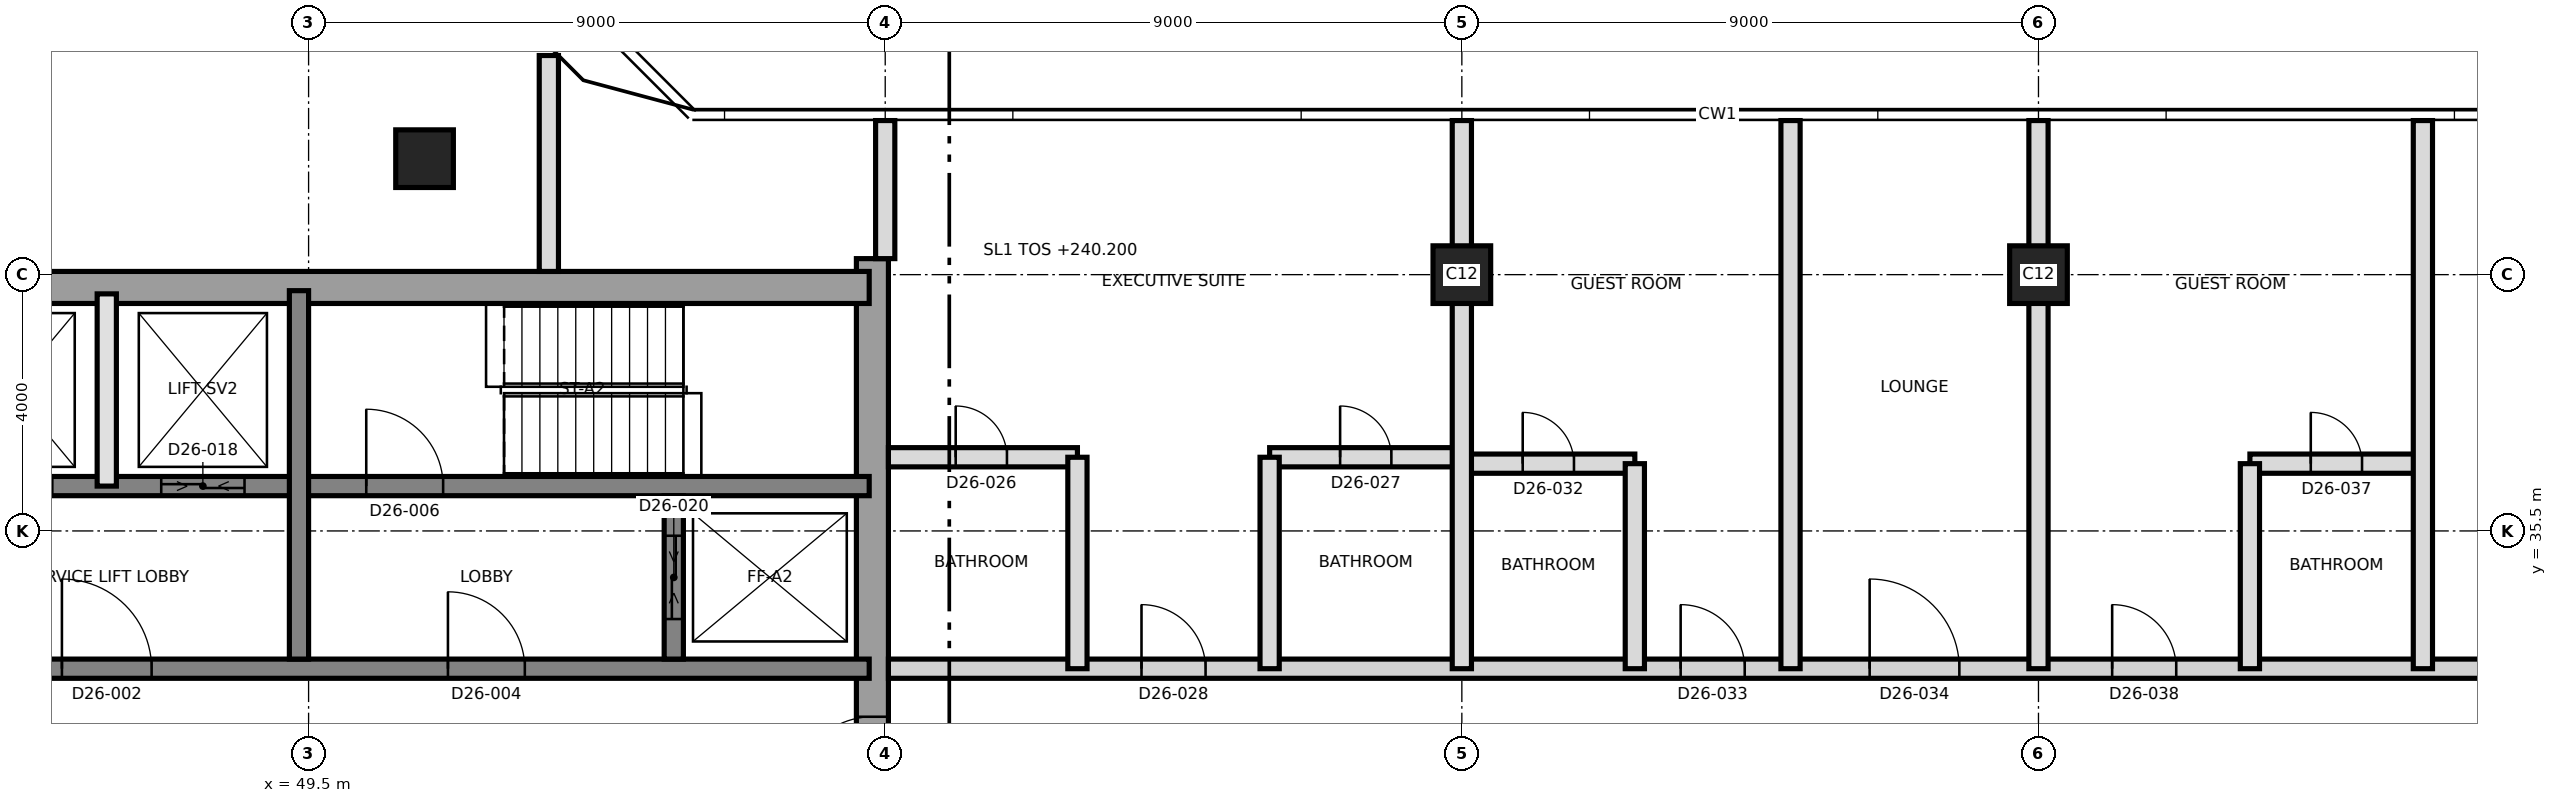
"""IFC4 building model, lengths in metres.
Left out: names, types, materials, properties, quantities, classifications, styles, units other than length and angle.
Written with IfcOpenShell. Run it as: python <this file> out.ifc"""

import sys

from ifc_helpers import new_model, si_unit, direction, frame, frame_2d, origin, origin_2d, place, context, subcontext, project, spatial, rectangle, extrude, element, fill, save


model = new_model("IFC4")
c1 = context("Model", 3, precision=1e-05, world=origin(), true_north=direction((0.0, 1.0)))
c2 = subcontext(c1, "Body", "Model", "MODEL_VIEW")
j1 = project(units=[si_unit("LENGTHUNIT", "METRE"), si_unit("PLANEANGLEUNIT", "RADIAN")], contexts=[c1])
p1 = place(None, origin())
s1 = spatial("IfcSite", under=j1, at=p1, CompositionType="ELEMENT")
p2 = place(p1, origin())
s2 = spatial("IfcBuilding", under=s1, at=p2, CompositionType="ELEMENT")
p3 = place(p2, frame((0.0, 0.0, 240.2)))
s3 = spatial("IfcBuildingStorey", under=s2, at=p3, CompositionType="ELEMENT", Elevation=240.2)
p4 = place(p3, frame((58.3, 21.25, 0.0), z_axis=(0.0, 0.0, 1.0), x_axis=(0.0, 1.0, 0.0)))
e1 = element("IfcWall", 1, at=p4, inside=s3, PredefinedType="SHEAR", context=c2, shape_type="SweptSolid", body=[
    extrude(rectangle(XDim=18.5, YDim=0.5, at=frame_2d((9.25, 0.0))), origin(), (0.0, 0.0, 1.0), 3.7),
])
p5 = place(p4, frame((10.15, 0.0, 0.0)))
e2 = element("IfcOpeningElement", 2, at=p5, cuts=e1, PredefinedType="OPENING", context=c2, shape_type="SweptSolid", body=[
    extrude(rectangle(XDim=1.2, YDim=2.1, at=frame_2d((0.6, 1.05))), frame((0.0, 0.26, 0.0), z_axis=(0.0, -1.0, 0.0), x_axis=(1.0, 0.0, 0.0)), (0.0, 0.0, 1.0), 0.52),
])
p6 = place(p3, frame((31.25, 39.3, 0.0), z_axis=(0.0, 0.0, 1.0), x_axis=(1.0, 0.0, 0.0)))
e3 = element("IfcWall", 3, at=p6, inside=s3, PredefinedType="SHEAR", context=c2, shape_type="SweptSolid", body=[
    extrude(rectangle(XDim=27.0, YDim=0.5, at=frame_2d((13.5, 0.0))), origin(), (0.0, 0.0, 1.0), 3.7),
])
p7 = place(p6, frame((10.45, 0.0, 0.0)))
e4 = element("IfcOpeningElement", 4, at=p7, cuts=e3, PredefinedType="OPENING", context=c2, shape_type="SweptSolid", body=[
    extrude(rectangle(XDim=1.2, YDim=2.1, at=frame_2d((0.6, 1.05))), frame((0.0, 0.26, 0.0), z_axis=(0.0, -1.0, 0.0), x_axis=(1.0, 0.0, 0.0)), (0.0, 0.0, 1.0), 0.52),
])
p8 = place(p3, frame((31.75, 33.35, 0.0), z_axis=(0.0, 0.0, 1.0), x_axis=(1.0, 0.0, 0.0)))
e5 = element("IfcWall", 5, at=p8, inside=s3, PredefinedType="SHEAR", context=c2, shape_type="SweptSolid", body=[
    extrude(rectangle(XDim=26.5, YDim=0.3, at=frame_2d((13.25, 0.0))), origin(), (0.0, 0.0, 1.0), 3.7),
])
p9 = place(p8, frame((13.9, 0.0, 0.0)))
e6 = element("IfcOpeningElement", 6, at=p9, cuts=e5, PredefinedType="OPENING", context=c2, shape_type="SweptSolid", body=[
    extrude(rectangle(XDim=1.4, YDim=2.1, at=frame_2d((0.7, 1.05))), frame((0.0, 0.16, 0.0), z_axis=(0.0, -1.0, 0.0), x_axis=(1.0, 0.0, 0.0)), (0.0, 0.0, 1.0), 0.32),
])
p10 = place(p8, frame((5.375, 0.0, 0.0)))
e7 = element("IfcOpeningElement", 7, at=p10, cuts=e5, PredefinedType="OPENING", context=c2, shape_type="SweptSolid", body=[
    extrude(rectangle(XDim=1.2, YDim=2.1, at=frame_2d((0.6, 1.05))), frame((0.0, 0.16, 0.0), z_axis=(0.0, -1.0, 0.0), x_axis=(1.0, 0.0, 0.0)), (0.0, 0.0, 1.0), 0.32),
])
p11 = place(p8, frame((19.925, 0.0, 0.0)))
e8 = element("IfcOpeningElement", 8, at=p11, cuts=e5, PredefinedType="OPENING", context=c2, shape_type="SweptSolid", body=[
    extrude(rectangle(XDim=1.2, YDim=2.1, at=frame_2d((0.6, 1.05))), frame((0.0, 0.16, 0.0), z_axis=(0.0, -1.0, 0.0), x_axis=(1.0, 0.0, 0.0)), (0.0, 0.0, 1.0), 0.32),
])
p12 = place(p3, frame((43.5, 36.2, 0.0), z_axis=(0.0, 0.0, 1.0), x_axis=(1.0, 0.0, 0.0)))
e9 = element("IfcWall", 9, at=p12, inside=s3, PredefinedType="SHEAR", context=c2, shape_type="SweptSolid", body=[
    extrude(rectangle(XDim=14.75, YDim=0.3, at=frame_2d((7.375, 0.0))), origin(), (0.0, 0.0, 1.0), 3.7),
])
p13 = place(p12, frame((6.9, 0.0, 0.0)))
e10 = element("IfcOpeningElement", 10, at=p13, cuts=e9, PredefinedType="OPENING", context=c2, shape_type="SweptSolid", body=[
    extrude(rectangle(XDim=1.2, YDim=2.1, at=frame_2d((0.6, 1.05))), frame((0.0, 0.16, 0.0), z_axis=(0.0, -1.0, 0.0), x_axis=(1.0, 0.0, 0.0)), (0.0, 0.0, 1.0), 0.32),
])
p14 = place(p12, frame((0.7, 0.0, 0.0)))
e11 = element("IfcOpeningElement", 11, at=p14, cuts=e9, PredefinedType="OPENING", context=c2, shape_type="SweptSolid", body=[
    extrude(rectangle(XDim=1.3, YDim=2.4, at=frame_2d((0.65, 1.2))), frame((0.0, 0.16, 0.0), z_axis=(0.0, -1.0, 0.0), x_axis=(1.0, 0.0, 0.0)), (0.0, 0.0, 1.0), 0.32),
])
p15 = place(p12, frame((3.7, 0.0, 0.0)))
e12 = element("IfcOpeningElement", 12, at=p15, cuts=e9, PredefinedType="OPENING", context=c2, shape_type="SweptSolid", body=[
    extrude(rectangle(XDim=1.3, YDim=2.4, at=frame_2d((0.65, 1.2))), frame((0.0, 0.16, 0.0), z_axis=(0.0, -1.0, 0.0), x_axis=(1.0, 0.0, 0.0)), (0.0, 0.0, 1.0), 0.32),
])
p16 = place(p3, frame((49.35, 33.5, 0.0), z_axis=(0.0, 0.0, 1.0), x_axis=(0.0, 1.0, 0.0)))
e13 = element("IfcWall", 13, at=p16, inside=s3, PredefinedType="SHEAR", context=c2, shape_type="SweptSolid", body=[
    extrude(rectangle(XDim=5.75, YDim=0.3, at=frame_2d((2.875, 0.0))), origin(), (0.0, 0.0, 1.0), 3.7),
])
p17 = place(p3, frame((55.2, 33.5, 0.0), z_axis=(0.0, 0.0, 1.0), x_axis=(0.0, 1.0, 0.0)))
e14 = element("IfcWall", 14, at=p17, inside=s3, PredefinedType="SHEAR", context=c2, shape_type="SweptSolid", body=[
    extrude(rectangle(XDim=2.55, YDim=0.3, at=frame_2d((1.275, 0.0))), origin(), (0.0, 0.0, 1.0), 3.7),
])
p18 = place(p17, frame((0.625, 0.0, 0.0)))
e15 = element("IfcOpeningElement", 15, at=p18, cuts=e14, PredefinedType="OPENING", context=c2, shape_type="SweptSolid", body=[
    extrude(rectangle(XDim=1.3, YDim=2.4, at=frame_2d((0.65, 1.2))), frame((0.0, 0.16, 0.0), z_axis=(0.0, -1.0, 0.0), x_axis=(1.0, 0.0, 0.0)), (0.0, 0.0, 1.0), 0.32),
])
for number, where, z_axis, x_axis in (
    (16, (67.5, 39.5, 0.0), (0.0, 0.0, 1.0), (1.0, 0.0, 0.0)),
    (17, (76.5, 39.5, 0.0), (0.0, 0.0, 1.0), (1.0, 0.0, 0.0)),
    (18, (51.31, 41.31, 0.0), (0.0, 0.0, 1.0), (1.0, 0.0, 0.0)),
):
    element("IfcColumn", number, at=place(p3, frame(where, z_axis=z_axis, x_axis=x_axis)), inside=s3, PredefinedType="COLUMN", context=c2, shape_type="SweptSolid", body=[
        extrude(rectangle(XDim=0.9, YDim=0.9, at=origin_2d()), origin(), (0.0, 0.0, 1.0), 3.7),
    ])
p19 = place(p3, frame((46.35, 36.2, 0.0), z_axis=(0.0, 0.0, 1.0), x_axis=(0.0, 1.0, 0.0)))
e19 = element("IfcWall", 19, at=p19, inside=s3, PredefinedType="SOLIDWALL", context=c2, shape_type="SweptSolid", body=[
    extrude(rectangle(XDim=3.0, YDim=0.3, at=frame_2d((1.5, 0.0))), origin(), (0.0, 0.0, 1.0), 3.4),
])
p20 = place(p3, frame((58.55, 33.35, 0.0), z_axis=(0.0, 0.0, 1.0), x_axis=(1.0, 0.0, 0.0)))
e20 = element("IfcWall", 20, at=p20, inside=s3, PredefinedType="PARTITIONING", context=c2, shape_type="SweptSolid", body=[
    extrude(rectangle(XDim=26.78, YDim=0.3, at=frame_2d((13.39, 0.0))), origin(), (0.0, 0.0, 1.0), 3.4),
])
p21 = place(p20, frame((3.95, 0.0, 0.0)))
e21 = element("IfcOpeningElement", 21, at=p21, cuts=e20, PredefinedType="OPENING", context=c2, shape_type="SweptSolid", body=[
    extrude(rectangle(XDim=1.0, YDim=2.4, at=frame_2d((0.5, 1.2))), frame((0.0, 0.16, 0.0), z_axis=(0.0, -1.0, 0.0), x_axis=(1.0, 0.0, 0.0)), (0.0, 0.0, 1.0), 0.32),
])
p22 = place(p20, frame((12.365, 0.0, 0.0)))
e22 = element("IfcOpeningElement", 22, at=p22, cuts=e20, PredefinedType="OPENING", context=c2, shape_type="SweptSolid", body=[
    extrude(rectangle(XDim=1.0, YDim=2.1, at=frame_2d((0.5, 1.05))), frame((0.0, 0.16, 0.0), z_axis=(0.0, -1.0, 0.0), x_axis=(1.0, 0.0, 0.0)), (0.0, 0.0, 1.0), 0.32),
])
p23 = place(p20, frame((15.315, 0.0, 0.0)))
e23 = element("IfcOpeningElement", 23, at=p23, cuts=e20, PredefinedType="OPENING", context=c2, shape_type="SweptSolid", body=[
    extrude(rectangle(XDim=1.4, YDim=2.1, at=frame_2d((0.7, 1.05))), frame((0.0, 0.16, 0.0), z_axis=(0.0, -1.0, 0.0), x_axis=(1.0, 0.0, 0.0)), (0.0, 0.0, 1.0), 0.32),
])
p24 = place(p20, frame((19.1, 0.0, 0.0)))
e24 = element("IfcOpeningElement", 24, at=p24, cuts=e20, PredefinedType="OPENING", context=c2, shape_type="SweptSolid", body=[
    extrude(rectangle(XDim=1.0, YDim=2.1, at=frame_2d((0.5, 1.05))), frame((0.0, 0.16, 0.0), z_axis=(0.0, -1.0, 0.0), x_axis=(1.0, 0.0, 0.0)), (0.0, 0.0, 1.0), 0.32),
])
p25 = place(p20, frame((24.95, 0.0, 0.0)))
e25 = element("IfcOpeningElement", 25, at=p25, cuts=e20, PredefinedType="OPENING", context=c2, shape_type="SweptSolid", body=[
    extrude(rectangle(XDim=1.0, YDim=2.1, at=frame_2d((0.5, 1.05))), frame((0.0, 0.16, 0.0), z_axis=(0.0, -1.0, 0.0), x_axis=(1.0, 0.0, 0.0)), (0.0, 0.0, 1.0), 0.32),
])
p26 = place(p3, frame((67.5, 36.55, 0.0), z_axis=(0.0, 0.0, 1.0), x_axis=(1.0, 0.0, 0.0)))
e26 = element("IfcWall", 26, at=p26, inside=s3, PredefinedType="PARTITIONING", context=c2, shape_type="SweptSolid", body=[
    extrude(rectangle(XDim=2.7, YDim=0.3, at=frame_2d((1.35, 0.0))), origin(), (0.0, 0.0, 1.0), 3.4),
])
p27 = place(p26, frame((0.95, 0.0, 0.0)))
e27 = element("IfcOpeningElement", 27, at=p27, cuts=e26, PredefinedType="OPENING", context=c2, shape_type="SweptSolid", body=[
    extrude(rectangle(XDim=0.8, YDim=2.1, at=frame_2d((0.4, 1.05))), frame((0.0, 0.16, 0.0), z_axis=(0.0, -1.0, 0.0), x_axis=(1.0, 0.0, 0.0)), (0.0, 0.0, 1.0), 0.32),
])
p28 = place(p3, frame((79.8, 36.55, 0.0), z_axis=(0.0, 0.0, 1.0), x_axis=(1.0, 0.0, 0.0)))
e28 = element("IfcWall", 28, at=p28, inside=s3, PredefinedType="PARTITIONING", context=c2, shape_type="SweptSolid", body=[
    extrude(rectangle(XDim=2.7, YDim=0.3, at=frame_2d((1.35, 0.0))), origin(), (0.0, 0.0, 1.0), 3.4),
])
p29 = place(p28, frame((0.95, 0.0, 0.0)))
e29 = element("IfcOpeningElement", 29, at=p29, cuts=e28, PredefinedType="OPENING", context=c2, shape_type="SweptSolid", body=[
    extrude(rectangle(XDim=0.8, YDim=2.1, at=frame_2d((0.4, 1.05))), frame((0.0, 0.16, 0.0), z_axis=(0.0, -1.0, 0.0), x_axis=(1.0, 0.0, 0.0)), (0.0, 0.0, 1.0), 0.32),
])
p30 = place(p3, frame((58.55, 36.65, 0.0), z_axis=(0.0, 0.0, 1.0), x_axis=(1.0, 0.0, 0.0)))
e30 = element("IfcWall", 30, at=p30, inside=s3, PredefinedType="PARTITIONING", context=c2, shape_type="SweptSolid", body=[
    extrude(rectangle(XDim=2.95, YDim=0.3, at=frame_2d((1.475, 0.0))), origin(), (0.0, 0.0, 1.0), 3.4),
])
p31 = place(p30, frame((1.05, 0.0, 0.0)))
e31 = element("IfcOpeningElement", 31, at=p31, cuts=e30, PredefinedType="OPENING", context=c2, shape_type="SweptSolid", body=[
    extrude(rectangle(XDim=0.8, YDim=2.1, at=frame_2d((0.4, 1.05))), frame((0.0, 0.16, 0.0), z_axis=(0.0, -1.0, 0.0), x_axis=(1.0, 0.0, 0.0)), (0.0, 0.0, 1.0), 0.32),
])
p32 = place(p3, frame((64.5, 36.65, 0.0), z_axis=(0.0, 0.0, 1.0), x_axis=(1.0, 0.0, 0.0)))
e32 = element("IfcWall", 32, at=p32, inside=s3, PredefinedType="PARTITIONING", context=c2, shape_type="SweptSolid", body=[
    extrude(rectangle(XDim=3.0, YDim=0.3, at=frame_2d((1.5, 0.0))), origin(), (0.0, 0.0, 1.0), 3.4),
])
p33 = place(p32, frame((1.1, 0.0, 0.0)))
e33 = element("IfcOpeningElement", 33, at=p33, cuts=e32, PredefinedType="OPENING", context=c2, shape_type="SweptSolid", body=[
    extrude(rectangle(XDim=0.8, YDim=2.1, at=frame_2d((0.4, 1.05))), frame((0.0, 0.16, 0.0), z_axis=(0.0, -1.0, 0.0), x_axis=(1.0, 0.0, 0.0)), (0.0, 0.0, 1.0), 0.32),
])
p34 = place(p3, frame((53.25, 39.55, 0.0), z_axis=(0.0, 0.0, 1.0), x_axis=(0.0, 1.0, 0.0)))
e34 = element("IfcWall", 34, at=p34, inside=s3, PredefinedType="PARTITIONING", context=c2, shape_type="SweptSolid", body=[
    extrude(rectangle(XDim=3.37, YDim=0.3, at=frame_2d((1.685, 0.0))), origin(), (0.0, 0.0, 1.0), 3.35),
])
p35 = place(p3, frame((58.5, 39.75, 0.0), z_axis=(0.0, 0.0, 1.0), x_axis=(0.0, 1.0, 0.0)))
e35 = element("IfcWall", 35, at=p35, inside=s3, PredefinedType="PARTITIONING", context=c2, shape_type="SweptSolid", body=[
    extrude(rectangle(XDim=2.155, YDim=0.3, at=frame_2d((1.078, 0.0))), origin(), (0.0, 0.0, 1.0), 3.35),
])
for number, where, z_axis, x_axis in (
    (36, (61.5, 33.35, 0.0), (0.0, 0.0, 1.0), (0.0, 1.0, 0.0)),
    (37, (64.5, 33.35, 0.0), (0.0, 0.0, 1.0), (0.0, 1.0, 0.0)),
):
    element("IfcWall", number, at=place(p3, frame(where, z_axis=z_axis, x_axis=x_axis)), inside=s3, PredefinedType="PARTITIONING", context=c2, shape_type="SweptSolid", body=[
        extrude(rectangle(XDim=3.3, YDim=0.3, at=frame_2d((1.65, 0.0))), origin(), (0.0, 0.0, 1.0), 3.4),
    ])
p36 = place(p3, frame((67.5, 33.35, 0.0), z_axis=(0.0, 0.0, 1.0), x_axis=(0.0, 1.0, 0.0)))
e38 = element("IfcWall", 38, at=p36, inside=s3, PredefinedType="PARTITIONING", context=c2, shape_type="SweptSolid", body=[
    extrude(rectangle(XDim=8.555, YDim=0.3, at=frame_2d((4.277, 0.0))), origin(), (0.0, 0.0, 1.0), 3.35),
])
p37 = place(p3, frame((70.2, 33.35, 0.0), z_axis=(0.0, 0.0, 1.0), x_axis=(0.0, 1.0, 0.0)))
e39 = element("IfcWall", 39, at=p37, inside=s3, PredefinedType="PARTITIONING", context=c2, shape_type="SweptSolid", body=[
    extrude(rectangle(XDim=3.2, YDim=0.3, at=frame_2d((1.6, 0.0))), origin(), (0.0, 0.0, 1.0), 3.4),
])
for number, where, z_axis, x_axis in (
    (40, (72.63, 33.35, 0.0), (0.0, 0.0, 1.0), (0.0, 1.0, 0.0)),
    (41, (76.5, 33.35, 0.0), (0.0, 0.0, 1.0), (0.0, 1.0, 0.0)),
):
    element("IfcWall", number, at=place(p3, frame(where, z_axis=z_axis, x_axis=x_axis)), inside=s3, PredefinedType="PARTITIONING", context=c2, shape_type="SweptSolid", body=[
        extrude(rectangle(XDim=8.555, YDim=0.3, at=frame_2d((4.277, 0.0))), origin(), (0.0, 0.0, 1.0), 3.35),
    ])
p38 = place(p3, frame((79.8, 33.35, 0.0), z_axis=(0.0, 0.0, 1.0), x_axis=(0.0, 1.0, 0.0)))
e42 = element("IfcWall", 42, at=p38, inside=s3, PredefinedType="PARTITIONING", context=c2, shape_type="SweptSolid", body=[
    extrude(rectangle(XDim=3.2, YDim=0.3, at=frame_2d((1.6, 0.0))), origin(), (0.0, 0.0, 1.0), 3.4),
])
p39 = place(p3, frame((82.5, 33.35, 0.0), z_axis=(0.0, 0.0, 1.0), x_axis=(0.0, 1.0, 0.0)))
e43 = element("IfcWall", 43, at=p39, inside=s3, PredefinedType="PARTITIONING", context=c2, shape_type="SweptSolid", body=[
    extrude(rectangle(XDim=8.555, YDim=0.3, at=frame_2d((4.277, 0.0))), origin(), (0.0, 0.0, 1.0), 3.35),
])
p40 = place(p9, origin())
e44 = element("IfcDoor", 44, at=p40, inside=s3, OperationType="SINGLE_SWING_RIGHT", PredefinedType="DOOR", context=c2, shape_type="SweptSolid", body=[
    extrude(rectangle(XDim=1.4, YDim=2.1, at=frame_2d((0.7, 1.05))), frame((0.0, 0.025, 0.0), z_axis=(0.0, -1.0, 0.0), x_axis=(1.0, 0.0, 0.0)), (0.0, 0.0, 1.0), 0.05),
])
fill(e6, e44)
p41 = place(p11, origin())
e45 = element("IfcDoor", 45, at=p41, inside=s3, OperationType="SINGLE_SWING_RIGHT", PredefinedType="DOOR", context=c2, shape_type="SweptSolid", body=[
    extrude(rectangle(XDim=1.2, YDim=2.1, at=frame_2d((0.6, 1.05))), frame((0.0, 0.025, 0.0), z_axis=(0.0, -1.0, 0.0), x_axis=(1.0, 0.0, 0.0)), (0.0, 0.0, 1.0), 0.05),
])
fill(e8, e45)
p42 = place(p13, origin())
e46 = element("IfcDoor", 46, at=p42, inside=s3, OperationType="SINGLE_SWING_LEFT", PredefinedType="DOOR", context=c2, shape_type="SweptSolid", body=[
    extrude(rectangle(XDim=1.2, YDim=2.1, at=frame_2d((0.6, 1.05))), frame((0.0, 0.025, 0.0), z_axis=(0.0, -1.0, 0.0), x_axis=(1.0, 0.0, 0.0)), (0.0, 0.0, 1.0), 0.05),
])
fill(e10, e46)
p43 = place(p5, origin())
e47 = element("IfcDoor", 47, at=p43, inside=s3, OperationType="SINGLE_SWING_LEFT", PredefinedType="DOOR", context=c2, shape_type="SweptSolid", body=[
    extrude(rectangle(XDim=1.2, YDim=2.1, at=frame_2d((0.6, 1.05))), frame((0.0, 0.025, 0.0), z_axis=(0.0, -1.0, 0.0), x_axis=(1.0, 0.0, 0.0)), (0.0, 0.0, 1.0), 0.05),
])
fill(e2, e47)
p44 = place(p15, origin())
e48 = element("IfcDoor", 48, at=p44, inside=s3, OperationType="SLIDING_TO_LEFT", PredefinedType="DOOR", context=c2, shape_type="SweptSolid", body=[
    extrude(rectangle(XDim=1.3, YDim=2.4, at=frame_2d((0.65, 1.2))), frame((0.0, 0.025, 0.0), z_axis=(0.0, -1.0, 0.0), x_axis=(1.0, 0.0, 0.0)), (0.0, 0.0, 1.0), 0.05),
])
fill(e12, e48)
p45 = place(p18, origin())
e49 = element("IfcDoor", 49, at=p45, inside=s3, OperationType="SLIDING_TO_LEFT", PredefinedType="DOOR", context=c2, shape_type="SweptSolid", body=[
    extrude(rectangle(XDim=1.3, YDim=2.4, at=frame_2d((0.65, 1.2))), frame((0.0, 0.025, 0.0), z_axis=(0.0, -1.0, 0.0), x_axis=(1.0, 0.0, 0.0)), (0.0, 0.0, 1.0), 0.05),
])
fill(e15, e49)
p46 = place(p31, origin())
e50 = element("IfcDoor", 50, at=p46, inside=s3, OperationType="SINGLE_SWING_LEFT", PredefinedType="DOOR", context=c2, shape_type="SweptSolid", body=[
    extrude(rectangle(XDim=0.8, YDim=2.1, at=frame_2d((0.4, 1.05))), frame((0.0, 0.025, 0.0), z_axis=(0.0, -1.0, 0.0), x_axis=(1.0, 0.0, 0.0)), (0.0, 0.0, 1.0), 0.05),
])
fill(e31, e50)
p47 = place(p33, origin())
e51 = element("IfcDoor", 51, at=p47, inside=s3, OperationType="SINGLE_SWING_RIGHT", PredefinedType="DOOR", context=c2, shape_type="SweptSolid", body=[
    extrude(rectangle(XDim=0.8, YDim=2.1, at=frame_2d((0.4, 1.05))), frame((0.0, 0.025, 0.0), z_axis=(0.0, -1.0, 0.0), x_axis=(1.0, 0.0, 0.0)), (0.0, 0.0, 1.0), 0.05),
])
fill(e33, e51)
p48 = place(p21, origin())
e52 = element("IfcDoor", 52, at=p48, inside=s3, OperationType="SINGLE_SWING_LEFT", PredefinedType="DOOR", context=c2, shape_type="SweptSolid", body=[
    extrude(rectangle(XDim=1.0, YDim=2.4, at=frame_2d((0.5, 1.2))), frame((0.0, 0.025, 0.0), z_axis=(0.0, -1.0, 0.0), x_axis=(1.0, 0.0, 0.0)), (0.0, 0.0, 1.0), 0.05),
])
fill(e21, e52)
p49 = place(p27, origin())
e53 = element("IfcDoor", 53, at=p49, inside=s3, OperationType="SINGLE_SWING_LEFT", PredefinedType="DOOR", context=c2, shape_type="SweptSolid", body=[
    extrude(rectangle(XDim=0.8, YDim=2.1, at=frame_2d((0.4, 1.05))), frame((0.0, 0.025, 0.0), z_axis=(0.0, -1.0, 0.0), x_axis=(1.0, 0.0, 0.0)), (0.0, 0.0, 1.0), 0.05),
])
fill(e27, e53)
p50 = place(p22, origin())
e54 = element("IfcDoor", 54, at=p50, inside=s3, OperationType="SINGLE_SWING_LEFT", PredefinedType="DOOR", context=c2, shape_type="SweptSolid", body=[
    extrude(rectangle(XDim=1.0, YDim=2.1, at=frame_2d((0.5, 1.05))), frame((0.0, 0.025, 0.0), z_axis=(0.0, -1.0, 0.0), x_axis=(1.0, 0.0, 0.0)), (0.0, 0.0, 1.0), 0.05),
])
fill(e22, e54)
p51 = place(p23, origin())
e55 = element("IfcDoor", 55, at=p51, inside=s3, OperationType="SINGLE_SWING_RIGHT", PredefinedType="DOOR", context=c2, shape_type="SweptSolid", body=[
    extrude(rectangle(XDim=1.4, YDim=2.1, at=frame_2d((0.7, 1.05))), frame((0.0, 0.025, 0.0), z_axis=(0.0, -1.0, 0.0), x_axis=(1.0, 0.0, 0.0)), (0.0, 0.0, 1.0), 0.05),
])
fill(e23, e55)
p52 = place(p29, origin())
e56 = element("IfcDoor", 56, at=p52, inside=s3, OperationType="SINGLE_SWING_LEFT", PredefinedType="DOOR", context=c2, shape_type="SweptSolid", body=[
    extrude(rectangle(XDim=0.8, YDim=2.1, at=frame_2d((0.4, 1.05))), frame((0.0, 0.025, 0.0), z_axis=(0.0, -1.0, 0.0), x_axis=(1.0, 0.0, 0.0)), (0.0, 0.0, 1.0), 0.05),
])
fill(e29, e56)
p53 = place(p24, origin())
e57 = element("IfcDoor", 57, at=p53, inside=s3, OperationType="SINGLE_SWING_RIGHT", PredefinedType="DOOR", context=c2, shape_type="SweptSolid", body=[
    extrude(rectangle(XDim=1.0, YDim=2.1, at=frame_2d((0.5, 1.05))), frame((0.0, 0.025, 0.0), z_axis=(0.0, -1.0, 0.0), x_axis=(1.0, 0.0, 0.0)), (0.0, 0.0, 1.0), 0.05),
])
fill(e24, e57)
save(model, sys.argv[1])
